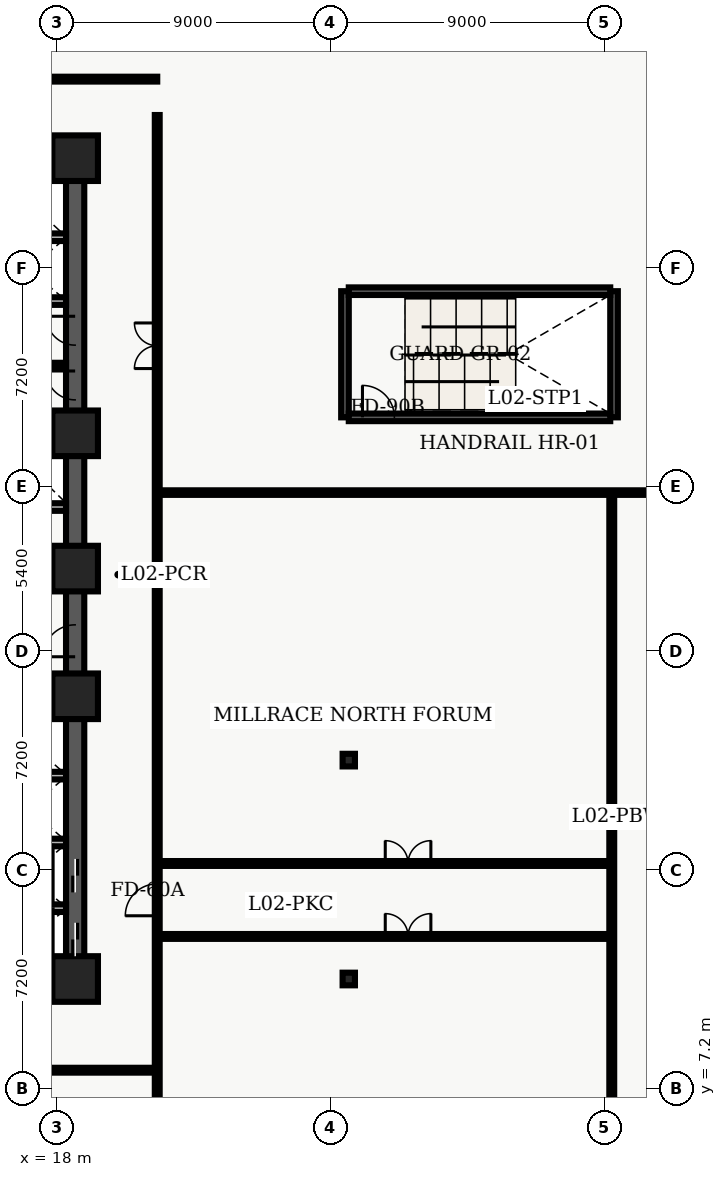
"""IFC4 building model, lengths in metres.
Left out: names, types, materials, properties, quantities, classifications, styles, units other than length and angle.
Written with IfcOpenShell. Run it as: python <this file> out.ifc"""

import sys

from ifc_helpers import new_model, entity, si_unit, converted_unit, direction, frame, origin_with_axes, origin_2d_with_axis, place, context, subcontext, project, spatial, polyline, rectangle, i_section, outline, extrude, element, fill, save


model = new_model("IFC4")
c1 = context("Model", 3, precision=1e-05, world=origin_with_axes(), true_north=direction((0.0, 1.0)))
c2 = subcontext(c1, "Body", "Model", "MODEL_VIEW")
j1 = project(units=[si_unit("LENGTHUNIT", "METRE"), converted_unit("PLANEANGLEUNIT", "DEGREE", entity("IfcPlaneAngleMeasure", 0.017), si_unit("PLANEANGLEUNIT", "RADIAN"), dimensions=[0, 0, 0, 0, 0, 0, 0])], contexts=[c1])
p1 = place(None, origin_with_axes())
s1 = spatial("IfcSite", under=j1, at=p1, CompositionType="ELEMENT")
p2 = place(p1, origin_with_axes())
s2 = spatial("IfcBuilding", under=s1, at=p2, CompositionType="ELEMENT")
p3 = place(p2, frame((0.0, 0.0, 10.8), z_axis=(0.0, 0.0, 1.0), x_axis=(1.0, 0.0, 0.0)))
s3 = spatial("IfcBuildingStorey", under=s2, at=p3, CompositionType="ELEMENT", Elevation=10.8)
p4 = place(p3, frame((11.4, 10.8, 0.0), z_axis=(0.0, 0.0, 1.0), x_axis=(1.0, 0.0, 0.0)))
e1 = element("IfcWall", 1, at=p4, inside=s3, PredefinedType="SHEAR", context=c2, shape_type="SweptSolid", body=[
    extrude(outline(polyline([(0.0, -0.3), (7.2, -0.3), (7.2, 0.3), (0.0, 0.3), (0.0, -0.3)])), origin_with_axes(), (0.0, 0.0, 1.0), 4.26),
])
p5 = place(p4, frame((2.625, 0.0, 0.0), z_axis=(0.0, 0.0, 1.0), x_axis=(1.0, 0.0, 0.0)))
e2 = element("IfcOpeningElement", 2, at=p5, cuts=e1, PredefinedType="OPENING", context=c2, shape_type="SweptSolid", body=[
    extrude(rectangle(XDim=1.05, YDim=0.62, at=origin_2d_with_axis()), origin_with_axes(), (0.0, 0.0, 1.0), 2.15),
])
p6 = place(p3, frame((11.4, 37.8, 0.0), z_axis=(0.0, 0.0, 1.0), x_axis=(1.0, 0.0, 0.0)))
e3 = element("IfcWall", 3, at=p6, inside=s3, PredefinedType="SHEAR", context=c2, shape_type="SweptSolid", body=[
    extrude(outline(polyline([(0.0, -0.3), (7.2, -0.3), (7.2, 0.3), (0.0, 0.3), (0.0, -0.3)])), origin_with_axes(), (0.0, 0.0, 1.0), 4.26),
])
p7 = place(p6, frame((2.625, 0.0, 0.0), z_axis=(0.0, 0.0, 1.0), x_axis=(1.0, 0.0, 0.0)))
e4 = element("IfcOpeningElement", 4, at=p7, cuts=e3, PredefinedType="OPENING", context=c2, shape_type="SweptSolid", body=[
    extrude(rectangle(XDim=1.05, YDim=0.62, at=origin_2d_with_axis()), origin_with_axes(), (0.0, 0.0, 1.0), 2.15),
])
p8 = place(p3, frame((18.6, 10.8, 0.0), z_axis=(0.0, 0.0, 1.0), x_axis=(0.0, 1.0, 0.0)))
e5 = element("IfcWall", 5, at=p8, inside=s3, PredefinedType="SHEAR", context=c2, shape_type="SweptSolid", body=[
    extrude(outline(polyline([(0.0, -0.3), (13.5, -0.3), (13.5, 0.3), (0.0, 0.3), (0.0, -0.3)])), origin_with_axes(), (0.0, 0.0, 1.0), 4.26),
])
p9 = place(p8, frame((1.3, 0.0, 0.0), z_axis=(0.0, 0.0, 1.0), x_axis=(1.0, 0.0, 0.0)))
e6 = element("IfcOpeningElement", 6, at=p9, cuts=e5, PredefinedType="OPENING", context=c2, shape_type="SweptSolid", body=[
    extrude(rectangle(XDim=1.1, YDim=0.62, at=origin_2d_with_axis()), origin_with_axes(), (0.0, 0.0, 1.0), 2.15),
])
p10 = place(p8, frame((3.4, 0.0, 0.0), z_axis=(0.0, 0.0, 1.0), x_axis=(1.0, 0.0, 0.0)))
e7 = element("IfcOpeningElement", 7, at=p10, cuts=e5, PredefinedType="OPENING", context=c2, shape_type="SweptSolid", body=[
    extrude(rectangle(XDim=1.1, YDim=0.62, at=origin_2d_with_axis()), origin_with_axes(), (0.0, 0.0, 1.0), 2.15),
])
p11 = place(p8, frame((11.125, 0.0, 0.0), z_axis=(0.0, 0.0, 1.0), x_axis=(1.0, 0.0, 0.0)))
e8 = element("IfcOpeningElement", 8, at=p11, cuts=e5, PredefinedType="OPENING", context=c2, shape_type="SweptSolid", body=[
    extrude(rectangle(XDim=1.05, YDim=0.62, at=origin_2d_with_axis()), origin_with_axes(), (0.0, 0.0, 1.0), 2.15),
])
p12 = place(p3, frame((18.6, 24.3, 0.0), z_axis=(0.0, 0.0, 1.0), x_axis=(0.0, 1.0, 0.0)))
e9 = element("IfcWall", 9, at=p12, inside=s3, PredefinedType="SHEAR", context=c2, shape_type="SweptSolid", body=[
    extrude(outline(polyline([(0.0, -0.3), (13.5, -0.3), (13.5, 0.3), (0.0, 0.3), (0.0, -0.3)])), origin_with_axes(), (0.0, 0.0, 1.0), 4.26),
])
p13 = place(p12, frame((6.025, 0.0, 0.0), z_axis=(0.0, 0.0, 1.0), x_axis=(1.0, 0.0, 0.0)))
e10 = element("IfcOpeningElement", 10, at=p13, cuts=e9, PredefinedType="OPENING", context=c2, shape_type="SweptSolid", body=[
    extrude(rectangle(XDim=0.95, YDim=0.62, at=origin_2d_with_axis()), origin_with_axes(), (0.0, 0.0, 1.0), 2.15),
])
p14 = place(p12, frame((7.825, 0.0, 0.0), z_axis=(0.0, 0.0, 1.0), x_axis=(1.0, 0.0, 0.0)))
e11 = element("IfcOpeningElement", 11, at=p14, cuts=e9, PredefinedType="OPENING", context=c2, shape_type="SweptSolid", body=[
    extrude(rectangle(XDim=0.95, YDim=0.62, at=origin_2d_with_axis()), origin_with_axes(), (0.0, 0.0, 1.0), 2.15),
])
for number, where, z_axis, x_axis in (
    (12, (11.7, 19.825, 0.0), (0.0, 0.0, 1.0), (1.0, 0.0, 0.0)),
    (13, (11.7, 28.775, 0.0), (0.0, 0.0, 1.0), (1.0, 0.0, 0.0)),
):
    element("IfcWall", number, at=place(p3, frame(where, z_axis=z_axis, x_axis=x_axis)), inside=s3, PredefinedType="SHEAR", context=c2, shape_type="SweptSolid", body=[
        extrude(outline(polyline([(0.0, -0.125), (6.6, -0.125), (6.6, 0.125), (0.0, 0.125), (0.0, -0.125)])), origin_with_axes(), (0.0, 0.0, 1.0), 4.26),
    ])
p15 = place(p3, frame((11.7, 24.1, 0.0), z_axis=(0.0, 0.0, 1.0), x_axis=(1.0, 0.0, 0.0)))
e14 = element("IfcWall", 14, at=p15, inside=s3, PredefinedType="SOLIDWALL", context=c2, shape_type="SweptSolid", body=[
    extrude(outline(polyline([(0.0, -0.125), (6.6, -0.125), (6.6, 0.125), (0.0, 0.125), (0.0, -0.125)])), origin_with_axes(), (0.0, 0.0, 1.0), 3.3),
])
p16 = place(p15, frame((3.6, 0.0, 0.0), z_axis=(0.0, 0.0, 1.0), x_axis=(1.0, 0.0, 0.0)))
e15 = element("IfcOpeningElement", 15, at=p16, cuts=e14, PredefinedType="OPENING", context=c2, shape_type="SweptSolid", body=[
    extrude(rectangle(XDim=0.9, YDim=0.27, at=origin_2d_with_axis()), origin_with_axes(), (0.0, 0.0, 1.0), 2.15),
])
p17 = place(p15, frame((5.65, 0.0, 0.0), z_axis=(0.0, 0.0, 1.0), x_axis=(1.0, 0.0, 0.0)))
e16 = element("IfcOpeningElement", 16, at=p17, cuts=e14, PredefinedType="OPENING", context=c2, shape_type="SweptSolid", body=[
    extrude(rectangle(XDim=0.9, YDim=0.27, at=origin_2d_with_axis()), origin_with_axes(), (0.0, 0.0, 1.0), 2.15),
])
p18 = place(p3, frame((11.7, 26.325, 0.0), z_axis=(0.0, 0.0, 1.0), x_axis=(1.0, 0.0, 0.0)))
e17 = element("IfcWall", 17, at=p18, inside=s3, PredefinedType="SOLIDWALL", context=c2, shape_type="SweptSolid", body=[
    extrude(outline(polyline([(0.0, -0.125), (6.6, -0.125), (6.6, 0.125), (0.0, 0.125), (0.0, -0.125)])), origin_with_axes(), (0.0, 0.0, 1.0), 3.3),
])
p19 = place(p18, frame((3.5, 0.0, 0.0), z_axis=(0.0, 0.0, 1.0), x_axis=(1.0, 0.0, 0.0)))
e18 = element("IfcOpeningElement", 18, at=p19, cuts=e17, PredefinedType="OPENING", context=c2, shape_type="SweptSolid", body=[
    extrude(rectangle(XDim=0.9, YDim=0.27, at=origin_2d_with_axis()), origin_with_axes(), (0.0, 0.0, 1.0), 2.15),
])
for number, where, z_axis, x_axis in (
    (19, (27.475, 29.275, 0.0), (0.0, 0.0, 1.0), (0.0, 1.0, 0.0)),
    (20, (36.325, 29.275, 0.0), (0.0, 0.0, 1.0), (0.0, 1.0, 0.0)),
):
    element("IfcWall", number, at=place(p3, frame(where, z_axis=z_axis, x_axis=x_axis)), inside=s3, PredefinedType="SHEAR", context=c2, shape_type="SweptSolid", body=[
        extrude(outline(polyline([(0.0, -0.125), (4.15, -0.125), (4.15, 0.125), (0.0, 0.125), (0.0, -0.125)])), origin_with_axes(), (0.0, 0.0, 1.0), 4.26),
    ])
p20 = place(p3, frame((27.6, 29.275, 0.0), z_axis=(0.0, 0.0, 1.0), x_axis=(1.0, 0.0, 0.0)))
e21 = element("IfcWall", 21, at=p20, inside=s3, PredefinedType="SHEAR", context=c2, shape_type="SweptSolid", body=[
    extrude(outline(polyline([(0.0, -0.125), (8.6, -0.125), (8.6, 0.125), (0.0, 0.125), (0.0, -0.125)])), origin_with_axes(), (0.0, 0.0, 1.0), 4.26),
])
p21 = place(p20, frame((0.975, 0.0, 0.0), z_axis=(0.0, 0.0, 1.0), x_axis=(1.0, 0.0, 0.0)))
e22 = element("IfcOpeningElement", 22, at=p21, cuts=e21, PredefinedType="OPENING", context=c2, shape_type="SweptSolid", body=[
    extrude(rectangle(XDim=1.05, YDim=0.27, at=origin_2d_with_axis()), origin_with_axes(), (0.0, 0.0, 1.0), 2.15),
])
p22 = place(p3, frame((27.6, 33.425, 0.0), z_axis=(0.0, 0.0, 1.0), x_axis=(1.0, 0.0, 0.0)))
e23 = element("IfcWall", 23, at=p22, inside=s3, PredefinedType="SHEAR", context=c2, shape_type="SweptSolid", body=[
    extrude(outline(polyline([(0.0, -0.125), (8.6, -0.125), (8.6, 0.125), (0.0, 0.125), (0.0, -0.125)])), origin_with_axes(), (0.0, 0.0, 1.0), 4.26),
])
for number, where, z_axis, x_axis in (
    (24, (18.6, 10.8, 0.0), (0.0, 0.0, 1.0), (1.0, 0.0, 0.0)),
    (25, (18.6, 20.1, 0.0), (0.0, 0.0, 1.0), (1.0, 0.0, 0.0)),
    (26, (18.6, 24.3, 0.0), (0.0, 0.0, 1.0), (1.0, 0.0, 0.0)),
    (27, (18.6, 28.75, 0.0), (0.0, 0.0, 1.0), (1.0, 0.0, 0.0)),
    (28, (18.6, 37.8, 0.0), (0.0, 0.0, 1.0), (1.0, 0.0, 0.0)),
):
    element("IfcColumn", number, at=place(p3, frame(where, z_axis=z_axis, x_axis=x_axis)), inside=s3, PredefinedType="COLUMN", context=c2, shape_type="SweptSolid", body=[
        extrude(rectangle(XDim=1.5, YDim=1.5, at=origin_2d_with_axis()), origin_with_axes(), (0.0, 0.0, 1.0), 4.5),
    ])
for number, where, z_axis, x_axis in (
    (29, (27.6, 10.8, 0.0), (0.0, 0.0, 1.0), (1.0, 0.0, 0.0)),
    (30, (27.6, 18.0, 0.0), (0.0, 0.0, 1.0), (1.0, 0.0, 0.0)),
):
    element("IfcColumn", number, at=place(p3, frame(where, z_axis=z_axis, x_axis=x_axis)), inside=s3, PredefinedType="COLUMN", context=c2, shape_type="SweptSolid", body=[
        extrude(i_section(OverallWidth=0.406, OverallDepth=0.416, WebThickness=0.03, FlangeThickness=0.048, FilletRadius=0.022, at=origin_2d_with_axis()), origin_with_axes(), (0.0, 0.0, 1.0), 4.5),
    ])
for number, where, z_axis, x_axis in (
    (31, (15.84, 13.13, 0.0), (0.0, 0.0, 1.0), (1.0, 0.0, 0.0)),
    (32, (15.84, 15.29, 0.0), (0.0, 0.0, 1.0), (1.0, 0.0, 0.0)),
    (33, (15.84, 17.49, 0.0), (0.0, 0.0, 1.0), (1.0, 0.0, 0.0)),
    (34, (15.84, 33.1, 0.0), (0.0, 0.0, 1.0), (1.0, 0.0, 0.0)),
    (35, (15.84, 35.2, 0.0), (0.0, 0.0, 1.0), (1.0, 0.0, 0.0)),
):
    element("IfcWall", number, at=place(p3, frame(where, z_axis=z_axis, x_axis=x_axis)), inside=s3, PredefinedType="SOLIDWALL", context=c2, shape_type="SweptSolid", body=[
        extrude(outline(polyline([(0.0, -0.125), (2.46, -0.125), (2.46, 0.125), (0.0, 0.125), (0.0, -0.125)])), origin_with_axes(), (0.0, 0.0, 1.0), 3.2),
    ])
p23 = place(p3, frame((15.84, 31.0, 0.0), z_axis=(0.0, 0.0, 1.0), x_axis=(1.0, 0.0, 0.0)))
e36 = element("IfcWall", 36, at=p23, inside=s3, PredefinedType="PARTITIONING", context=c2, shape_type="SweptSolid", body=[
    extrude(outline(polyline([(0.0, -0.07), (2.46, -0.07), (2.46, 0.07), (0.0, 0.07), (0.0, -0.07)])), origin_with_axes(), (0.0, 0.0, 1.0), 3.2),
])
p24 = place(p3, frame((0.38, 7.8, 0.0), z_axis=(0.0, 0.0, 1.0), x_axis=(1.0, 0.0, 0.0)))
e37 = element("IfcWall", 37, at=p24, inside=s3, PredefinedType="PARTITIONING", context=c2, shape_type="SweptSolid", body=[
    extrude(outline(polyline([(0.0, -0.08), (20.92, -0.08), (20.92, 0.08), (0.0, 0.08), (0.0, -0.08)])), origin_with_axes(), (0.0, 0.0, 1.0), 3.2),
])
p25 = place(p24, frame((3.7, 0.0, 0.0), z_axis=(0.0, 0.0, 1.0), x_axis=(1.0, 0.0, 0.0)))
e38 = element("IfcOpeningElement", 38, at=p25, cuts=e37, PredefinedType="OPENING", context=c2, shape_type="SweptSolid", body=[
    extrude(rectangle(XDim=1.0, YDim=0.18, at=origin_2d_with_axis()), origin_with_axes(), (0.0, 0.0, 1.0), 2.15),
])
p26 = place(p24, frame((15.3, 0.0, 0.0), z_axis=(0.0, 0.0, 1.0), x_axis=(1.0, 0.0, 0.0)))
e39 = element("IfcOpeningElement", 39, at=p26, cuts=e37, PredefinedType="OPENING", context=c2, shape_type="SweptSolid", body=[
    extrude(rectangle(XDim=1.0, YDim=0.18, at=origin_2d_with_axis()), origin_with_axes(), (0.0, 0.0, 1.0), 2.15),
])
p27 = place(p3, frame((0.38, 40.4, 0.0), z_axis=(0.0, 0.0, 1.0), x_axis=(1.0, 0.0, 0.0)))
e40 = element("IfcWall", 40, at=p27, inside=s3, PredefinedType="PARTITIONING", context=c2, shape_type="SweptSolid", body=[
    extrude(outline(polyline([(0.0, -0.08), (20.92, -0.08), (20.92, 0.08), (0.0, 0.08), (0.0, -0.08)])), origin_with_axes(), (0.0, 0.0, 1.0), 3.2),
])
p28 = place(p27, frame((15.25, 0.0, 0.0), z_axis=(0.0, 0.0, 1.0), x_axis=(1.0, 0.0, 0.0)))
e41 = element("IfcOpeningElement", 41, at=p28, cuts=e40, PredefinedType="OPENING", context=c2, shape_type="SweptSolid", body=[
    extrude(rectangle(XDim=1.5, YDim=0.18, at=origin_2d_with_axis()), origin_with_axes(), (0.0, 0.0, 1.0), 2.2),
])
p29 = place(p3, frame((21.3, 0.38, 0.0), z_axis=(0.0, 0.0, 1.0), x_axis=(0.0, 1.0, 0.0)))
e42 = element("IfcWall", 42, at=p29, inside=s3, PredefinedType="PARTITIONING", context=c2, shape_type="SweptSolid", body=[
    extrude(outline(polyline([(0.0, -0.08), (38.84, -0.08), (38.84, 0.08), (0.0, 0.08), (0.0, -0.08)])), origin_with_axes(), (0.0, 0.0, 1.0), 3.2),
])
p30 = place(p29, frame((13.025, 0.0, 0.0), z_axis=(0.0, 0.0, 1.0), x_axis=(1.0, 0.0, 0.0)))
e43 = element("IfcOpeningElement", 43, at=p30, cuts=e42, PredefinedType="OPENING", context=c2, shape_type="SweptSolid", body=[
    extrude(rectangle(XDim=1.05, YDim=0.18, at=origin_2d_with_axis()), origin_with_axes(), (0.0, 0.0, 1.0), 2.15),
])
p31 = place(p29, frame((31.25, 0.0, 0.0), z_axis=(0.0, 0.0, 1.0), x_axis=(1.0, 0.0, 0.0)))
e44 = element("IfcOpeningElement", 44, at=p31, cuts=e42, PredefinedType="OPENING", context=c2, shape_type="SweptSolid", body=[
    extrude(rectangle(XDim=1.5, YDim=0.18, at=origin_2d_with_axis()), origin_with_axes(), (0.0, 0.0, 1.0), 2.2),
])
p32 = place(p3, frame((21.3, 12.2, 0.0), z_axis=(0.0, 0.0, 1.0), x_axis=(1.0, 0.0, 0.0)))
e45 = element("IfcWall", 45, at=p32, inside=s3, PredefinedType="PARTITIONING", context=c2, shape_type="SweptSolid", body=[
    extrude(outline(polyline([(0.0, -0.08), (14.95, -0.08), (14.95, 0.08), (0.0, 0.08), (0.0, -0.08)])), origin_with_axes(), (0.0, 0.0, 1.0), 3.2),
])
p33 = place(p32, frame((8.25, 0.0, 0.0), z_axis=(0.0, 0.0, 1.0), x_axis=(1.0, 0.0, 0.0)))
e46 = element("IfcOpeningElement", 46, at=p33, cuts=e45, PredefinedType="OPENING", context=c2, shape_type="SweptSolid", body=[
    extrude(rectangle(XDim=1.5, YDim=0.18, at=origin_2d_with_axis()), origin_with_axes(), (0.0, 0.0, 1.0), 2.2),
])
p34 = place(p3, frame((21.3, 14.6, 0.0), z_axis=(0.0, 0.0, 1.0), x_axis=(1.0, 0.0, 0.0)))
e47 = element("IfcWall", 47, at=p34, inside=s3, PredefinedType="PARTITIONING", context=c2, shape_type="SweptSolid", body=[
    extrude(outline(polyline([(0.0, -0.08), (14.95, -0.08), (14.95, 0.08), (0.0, 0.08), (0.0, -0.08)])), origin_with_axes(), (0.0, 0.0, 1.0), 3.2),
])
p35 = place(p34, frame((8.25, 0.0, 0.0), z_axis=(0.0, 0.0, 1.0), x_axis=(1.0, 0.0, 0.0)))
e48 = element("IfcOpeningElement", 48, at=p35, cuts=e47, PredefinedType="OPENING", context=c2, shape_type="SweptSolid", body=[
    extrude(rectangle(XDim=1.5, YDim=0.18, at=origin_2d_with_axis()), origin_with_axes(), (0.0, 0.0, 1.0), 2.2),
])
p36 = place(p3, frame((36.25, 4.3, 0.0), z_axis=(0.0, 0.0, 1.0), x_axis=(0.0, 1.0, 0.0)))
e49 = element("IfcWall", 49, at=p36, inside=s3, PredefinedType="PARTITIONING", context=c2, shape_type="SweptSolid", body=[
    extrude(outline(polyline([(0.0, -0.08), (22.5, -0.08), (22.5, 0.08), (0.0, 0.08), (0.0, -0.08)])), origin_with_axes(), (0.0, 0.0, 1.0), 3.2),
])
p37 = place(p3, frame((21.3, 26.8, 0.0), z_axis=(0.0, 0.0, 1.0), x_axis=(1.0, 0.0, 0.0)))
e50 = element("IfcWall", 50, at=p37, inside=s3, PredefinedType="PARTITIONING", context=c2, shape_type="SweptSolid", body=[
    extrude(outline(polyline([(0.0, -0.075), (29.25, -0.075), (29.25, 0.075), (0.0, 0.075), (0.0, -0.075)])), origin_with_axes(), (0.0, 0.0, 1.0), 3.2),
])
p38 = place(p8, frame((1.3, 0.0, 0.0), z_axis=(0.0, 0.0, 1.0), x_axis=(1.0, 0.0, 0.0)))
e51 = element("IfcDoor", 51, at=p38, inside=s3, OperationType="SLIDING_TO_LEFT", PredefinedType="DOOR", context=c2, shape_type="SweptSolid", body=[
    extrude(rectangle(XDim=1.1, YDim=0.09, at=origin_2d_with_axis()), origin_with_axes(), (0.0, 0.0, 1.0), 2.15),
])
fill(e6, e51)
p39 = place(p8, frame((3.4, 0.0, 0.0), z_axis=(0.0, 0.0, 1.0), x_axis=(1.0, 0.0, 0.0)))
e52 = element("IfcDoor", 52, at=p39, inside=s3, OperationType="SLIDING_TO_RIGHT", PredefinedType="DOOR", context=c2, shape_type="SweptSolid", body=[
    extrude(rectangle(XDim=1.1, YDim=0.09, at=origin_2d_with_axis()), origin_with_axes(), (0.0, 0.0, 1.0), 2.15),
])
fill(e7, e52)
p40 = place(p8, frame((11.125, 0.0, 0.0), z_axis=(0.0, 0.0, 1.0), x_axis=(1.0, 0.0, 0.0)))
e53 = element("IfcDoor", 53, at=p40, inside=s3, OperationType="SINGLE_SWING_LEFT", PredefinedType="DOOR", context=c2, shape_type="SweptSolid", body=[
    extrude(rectangle(XDim=1.05, YDim=0.09, at=origin_2d_with_axis()), origin_with_axes(), (0.0, 0.0, 1.0), 2.15),
])
fill(e8, e53)
p41 = place(p12, frame((6.025, 0.0, 0.0), z_axis=(0.0, 0.0, 1.0), x_axis=(1.0, 0.0, 0.0)))
e54 = element("IfcDoor", 54, at=p41, inside=s3, OperationType="SINGLE_SWING_RIGHT", PredefinedType="DOOR", context=c2, shape_type="SweptSolid", body=[
    extrude(rectangle(XDim=0.95, YDim=0.09, at=origin_2d_with_axis()), origin_with_axes(), (0.0, 0.0, 1.0), 2.15),
])
fill(e10, e54)
p42 = place(p12, frame((7.825, 0.0, 0.0), z_axis=(0.0, 0.0, 1.0), x_axis=(1.0, 0.0, 0.0)))
e55 = element("IfcDoor", 55, at=p42, inside=s3, OperationType="SINGLE_SWING_RIGHT", PredefinedType="DOOR", context=c2, shape_type="SweptSolid", body=[
    extrude(rectangle(XDim=0.95, YDim=0.09, at=origin_2d_with_axis()), origin_with_axes(), (0.0, 0.0, 1.0), 2.15),
])
fill(e11, e55)
p43 = place(p20, frame((0.975, 0.0, 0.0), z_axis=(0.0, 0.0, 1.0), x_axis=(1.0, 0.0, 0.0)))
e56 = element("IfcDoor", 56, at=p43, inside=s3, OperationType="SINGLE_SWING_LEFT", PredefinedType="DOOR", context=c2, shape_type="SweptSolid", body=[
    extrude(rectangle(XDim=1.05, YDim=0.09, at=origin_2d_with_axis()), origin_with_axes(), (0.0, 0.0, 1.0), 2.15),
])
fill(e22, e56)
p44 = place(p29, frame((13.025, 0.0, 0.0), z_axis=(0.0, 0.0, 1.0), x_axis=(1.0, 0.0, 0.0)))
e57 = element("IfcDoor", 57, at=p44, inside=s3, OperationType="SINGLE_SWING_LEFT", PredefinedType="DOOR", context=c2, shape_type="SweptSolid", body=[
    extrude(rectangle(XDim=1.05, YDim=0.09, at=origin_2d_with_axis()), origin_with_axes(), (0.0, 0.0, 1.0), 2.15),
])
fill(e43, e57)
p45 = place(p32, frame((8.25, 0.0, 0.0), z_axis=(0.0, 0.0, 1.0), x_axis=(1.0, 0.0, 0.0)))
e58 = element("IfcDoor", 58, at=p45, inside=s3, OperationType="DOUBLE_DOOR_SINGLE_SWING", PredefinedType="DOOR", context=c2, shape_type="SweptSolid", body=[
    extrude(rectangle(XDim=1.5, YDim=0.09, at=origin_2d_with_axis()), origin_with_axes(), (0.0, 0.0, 1.0), 2.2),
])
fill(e46, e58)
p46 = place(p34, frame((8.25, 0.0, 0.0), z_axis=(0.0, 0.0, 1.0), x_axis=(1.0, 0.0, 0.0)))
e59 = element("IfcDoor", 59, at=p46, inside=s3, OperationType="DOUBLE_DOOR_SINGLE_SWING", PredefinedType="DOOR", context=c2, shape_type="SweptSolid", body=[
    extrude(rectangle(XDim=1.5, YDim=0.09, at=origin_2d_with_axis()), origin_with_axes(), (0.0, 0.0, 1.0), 2.2),
])
fill(e48, e59)
p47 = place(p29, frame((31.25, 0.0, 0.0), z_axis=(0.0, 0.0, 1.0), x_axis=(1.0, 0.0, 0.0)))
e60 = element("IfcDoor", 60, at=p47, inside=s3, OperationType="DOUBLE_DOOR_SINGLE_SWING", PredefinedType="DOOR", context=c2, shape_type="SweptSolid", body=[
    extrude(rectangle(XDim=1.5, YDim=0.09, at=origin_2d_with_axis()), origin_with_axes(), (0.0, 0.0, 1.0), 2.2),
])
fill(e44, e60)
save(model, sys.argv[1])
